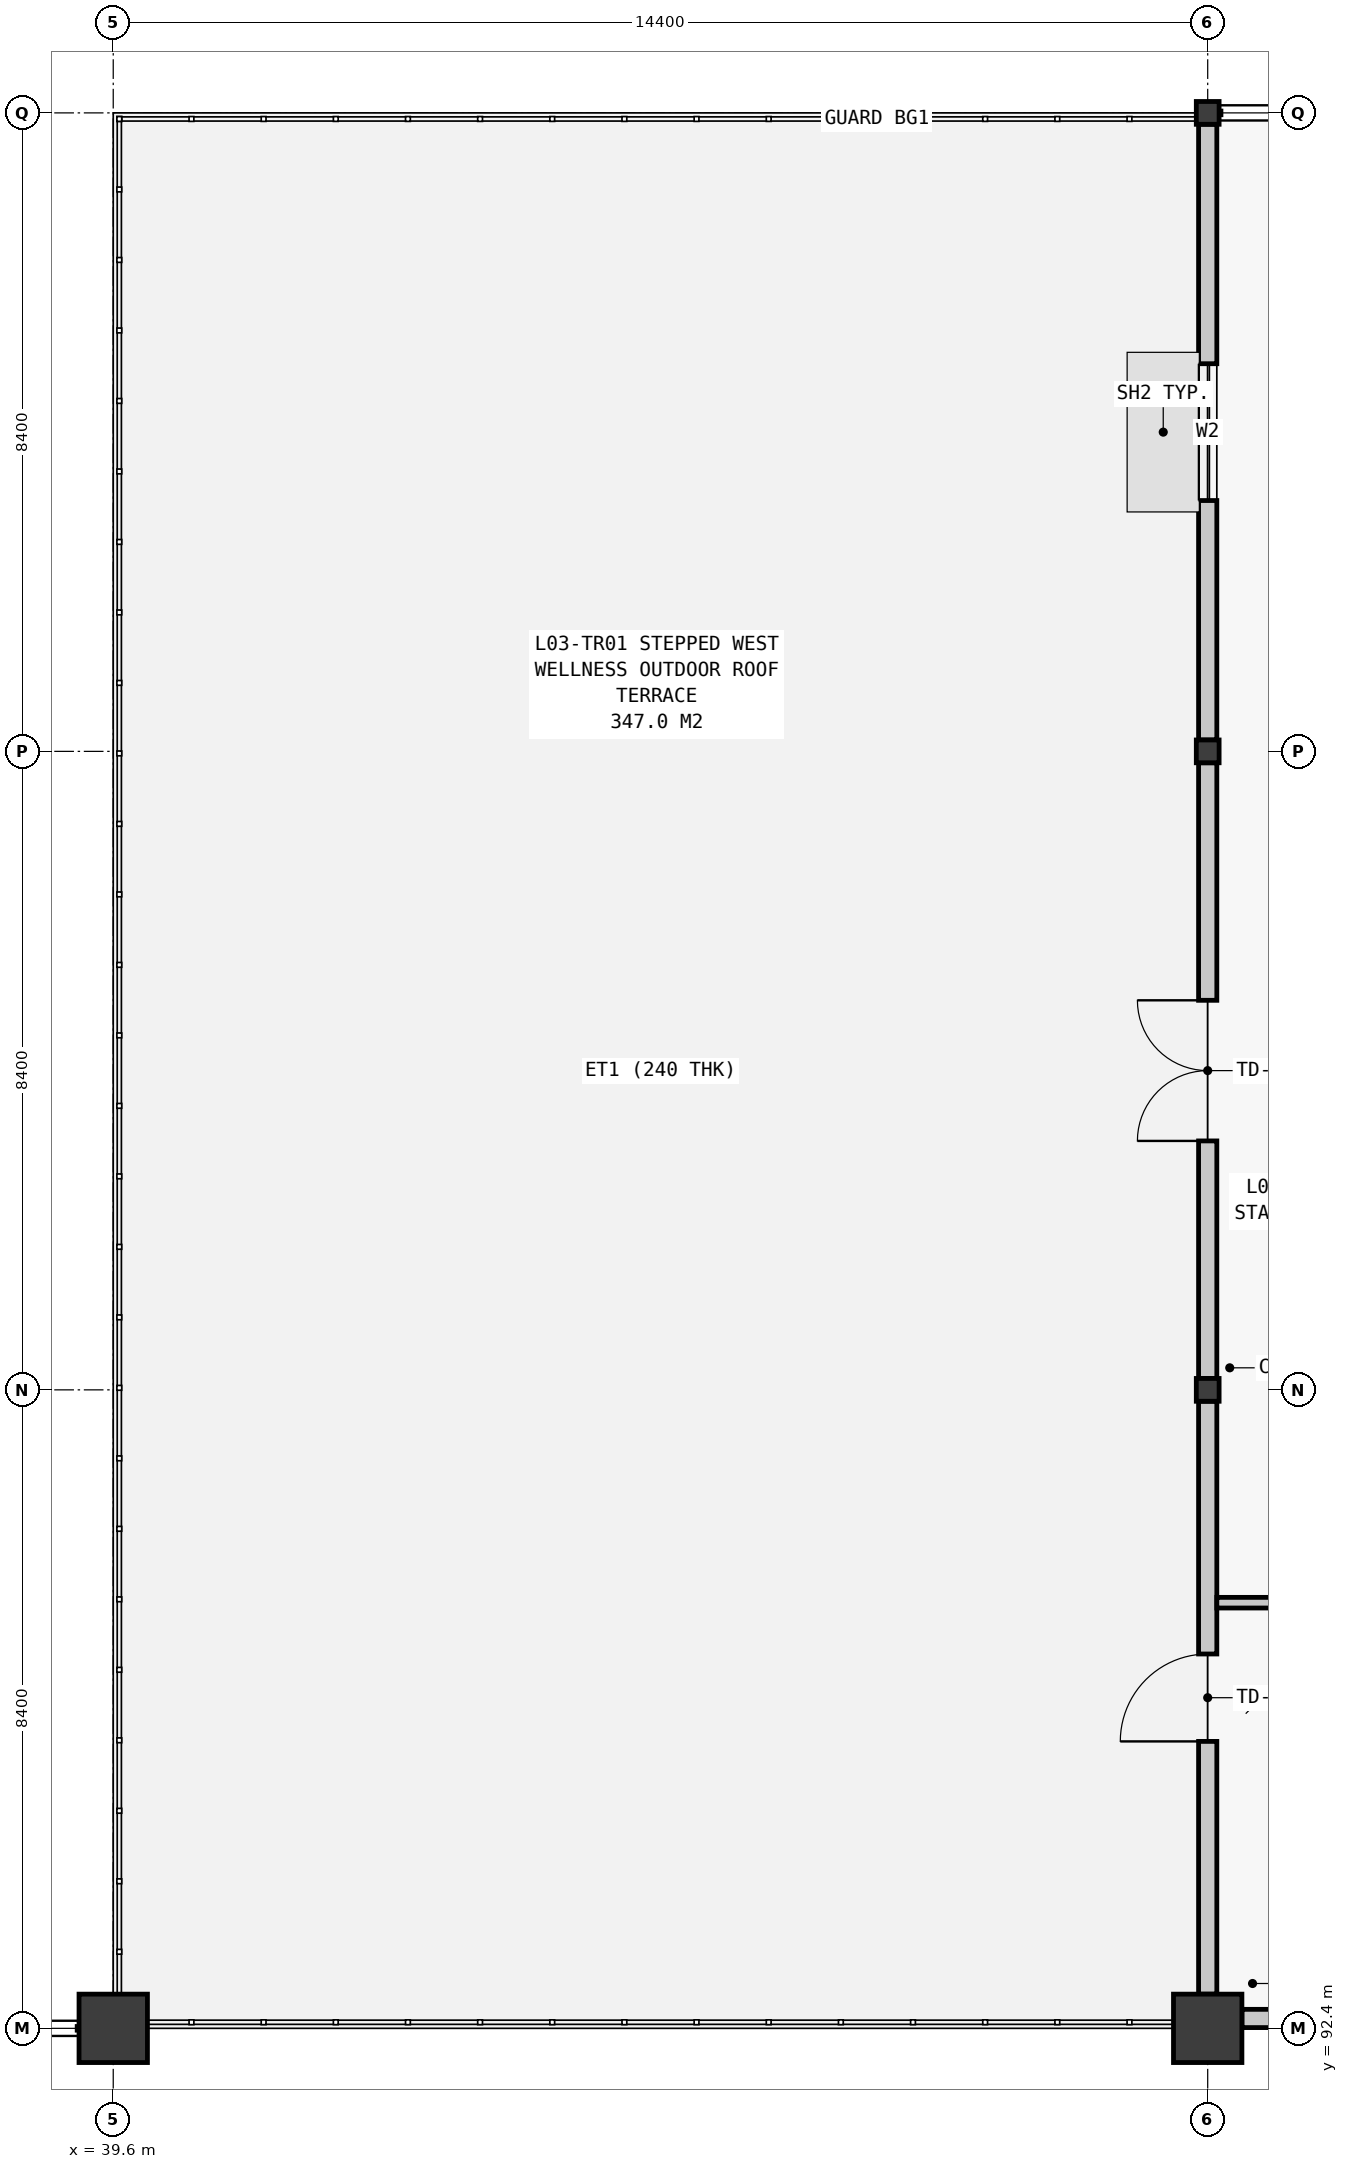
"""IFC4 building model, lengths in metres.
Left out: names, types, materials, properties, quantities, classifications, styles, units other than length and angle.
Written with IfcOpenShell. Run it as: python <this file> out.ifc"""

import sys

from ifc_helpers import new_model, si_unit, direction, frame, frame_2d, origin, origin_2d, place, context, subcontext, project, spatial, rectangle, i_section, extrude, element, fill, save


model = new_model("IFC4")
c1 = context("Model", 3, precision=1e-05, world=origin(), true_north=direction((0.0, 1.0)))
c2 = subcontext(c1, "Body", "Model", "MODEL_VIEW")
j1 = project(units=[si_unit("LENGTHUNIT", "METRE"), si_unit("PLANEANGLEUNIT", "RADIAN")], contexts=[c1])
p1 = place(None, origin())
s1 = spatial("IfcSite", under=j1, at=p1, CompositionType="ELEMENT")
p2 = place(p1, origin())
s2 = spatial("IfcBuilding", under=s1, at=p2, CompositionType="ELEMENT")
p3 = place(p2, frame((0.0, 0.0, 13.2)))
s3 = spatial("IfcBuildingStorey", under=s2, at=p3, CompositionType="ELEMENT", Elevation=13.2)
p4 = place(p3, frame((39.6, 92.4, 0.0), z_axis=(0.0, 0.0, 1.0), x_axis=(1.0, 0.0, 0.0)))
e1 = element("IfcColumn", 1, at=p4, inside=s3, PredefinedType="COLUMN", context=c2, shape_type="SweptSolid", body=[
    extrude(rectangle(XDim=0.9, YDim=0.9, at=origin_2d()), origin(), (0.0, 0.0, 1.0), 2.829),
])
p5 = place(p3, frame((54.0, 92.4, 0.0), z_axis=(0.0, 0.0, 1.0), x_axis=(1.0, 0.0, 0.0)))
e2 = element("IfcColumn", 2, at=p5, inside=s3, PredefinedType="COLUMN", context=c2, shape_type="SweptSolid", body=[
    extrude(rectangle(XDim=0.9, YDim=0.9, at=origin_2d()), origin(), (0.0, 0.0, 1.0), 0.994),
])
p6 = place(p3, frame((54.0, 92.4, 0.994), z_axis=(0.0, 0.0, 1.0), x_axis=(1.0, 0.0, 0.0)))
e3 = element("IfcColumn", 3, at=p6, inside=s3, PredefinedType="COLUMN", context=c2, shape_type="SweptSolid", body=[
    extrude(rectangle(XDim=0.65, YDim=0.65, at=origin_2d()), origin(), (0.0, 0.0, 1.0), 3.206),
])
for number, where, z_axis, x_axis in (
    (4, (54.0, 100.8, 0.0), (0.0, 0.0, 1.0), (1.0, 0.0, 0.0)),
    (5, (54.0, 109.2, 0.0), (0.0, 0.0, 1.0), (1.0, 0.0, 0.0)),
    (6, (54.0, 117.6, 0.0), (0.0, 0.0, 1.0), (1.0, 0.0, 0.0)),
):
    element("IfcColumn", number, at=place(p3, frame(where, z_axis=z_axis, x_axis=x_axis)), inside=s3, PredefinedType="COLUMN", context=c2, shape_type="SweptSolid", body=[
        extrude(i_section(OverallWidth=0.3, OverallDepth=0.3, WebThickness=0.011, FlangeThickness=0.019, FilletRadius=0.027, at=origin_2d()), origin(), (0.0, 0.0, 1.0), 4.2),
    ])
p7 = place(p3, frame((54.0, 100.65, 0.0), z_axis=(0.0, 0.0, 1.0), x_axis=(0.0, -1.0, 0.0)))
e7 = element("IfcWall", 7, at=p7, inside=s3, PredefinedType="STANDARD", context=c2, shape_type="SweptSolid", body=[
    extrude(rectangle(XDim=7.8, YDim=0.24, at=frame_2d((3.9, 0.0))), origin(), (0.0, 0.0, 1.0), 3.427),
])
p8 = place(p7, frame((3.325, 0.0, 0.0)))
e8 = element("IfcOpeningElement", 8, at=p8, cuts=e7, PredefinedType="OPENING", context=c2, shape_type="SweptSolid", body=[
    extrude(rectangle(XDim=1.15, YDim=2.25, at=frame_2d((0.575, 1.125))), frame((0.0, 0.135, 0.0), z_axis=(0.0, -1.0, 0.0), x_axis=(1.0, 0.0, 0.0)), (0.0, 0.0, 1.0), 0.27),
])
p9 = place(p3, frame((54.0, 109.05, 0.0), z_axis=(0.0, 0.0, 1.0), x_axis=(0.0, -1.0, 0.0)))
e9 = element("IfcWall", 9, at=p9, inside=s3, PredefinedType="STANDARD", context=c2, shape_type="SweptSolid", body=[
    extrude(rectangle(XDim=8.1, YDim=0.24, at=frame_2d((4.05, 0.0))), origin(), (0.0, 0.0, 1.0), 3.427),
])
p10 = place(p9, frame((3.125, 0.0, 0.0)))
e10 = element("IfcOpeningElement", 10, at=p10, cuts=e9, PredefinedType="OPENING", context=c2, shape_type="SweptSolid", body=[
    extrude(rectangle(XDim=1.85, YDim=2.25, at=frame_2d((0.925, 1.125))), frame((0.0, 0.135, 0.0), z_axis=(0.0, -1.0, 0.0), x_axis=(1.0, 0.0, 0.0)), (0.0, 0.0, 1.0), 0.27),
])
p11 = place(p3, frame((54.0, 117.45, 0.0), z_axis=(0.0, 0.0, 1.0), x_axis=(0.0, -1.0, 0.0)))
e11 = element("IfcWall", 11, at=p11, inside=s3, PredefinedType="STANDARD", context=c2, shape_type="SweptSolid", body=[
    extrude(rectangle(XDim=8.1, YDim=0.24, at=frame_2d((4.05, 0.0))), origin(), (0.0, 0.0, 1.0), 3.427),
])
p12 = place(p11, frame((3.15, 0.0, 0.9)))
e12 = element("IfcOpeningElement", 12, at=p12, cuts=e11, PredefinedType="OPENING", context=c2, shape_type="SweptSolid", body=[
    extrude(rectangle(XDim=1.8, YDim=1.8, at=frame_2d((0.9, 0.9))), frame((0.0, 0.135, 0.0), z_axis=(0.0, -1.0, 0.0), x_axis=(1.0, 0.0, 0.0)), (0.0, 0.0, 1.0), 0.27),
])
p13 = place(p3, frame((54.45, 92.53, 0.0), z_axis=(0.0, 0.0, 1.0), x_axis=(1.0, 0.0, 0.0)))
e13 = element("IfcWall", 13, at=p13, inside=s3, PredefinedType="STANDARD", context=c2, shape_type="SweptSolid", body=[
    extrude(rectangle(XDim=13.5, YDim=0.24, at=frame_2d((6.75, 0.0))), origin(), (0.0, 0.0, 1.0), 1.79),
])
p14 = place(p3, frame((54.12, 98.0, 0.0), z_axis=(0.0, 0.0, 1.0), x_axis=(1.0, 0.0, 0.0)))
e14 = element("IfcWall", 14, at=p14, inside=s3, PredefinedType="PARTITIONING", context=c2, shape_type="SweptSolid", body=[
    extrude(rectangle(XDim=23.88, YDim=0.14, at=frame_2d((11.94, 0.0))), origin(), (0.0, 0.0, 1.0), 3.97),
])
p15 = place(p14, frame((11.465, 0.0, 0.0)))
e15 = element("IfcOpeningElement", 15, at=p15, cuts=e14, PredefinedType="OPENING", context=c2, shape_type="SweptSolid", body=[
    extrude(rectangle(XDim=0.95, YDim=2.15, at=frame_2d((0.475, 1.075))), frame((0.0, 0.085, 0.0), z_axis=(0.0, -1.0, 0.0), x_axis=(1.0, 0.0, 0.0)), (0.0, 0.0, 1.0), 0.17),
])
p16 = place(p8, frame((1.15, 0.0, 0.0), z_axis=(0.0, 0.0, 1.0), x_axis=(-1.0, 0.0, 0.0)))
e16 = element("IfcDoor", 16, at=p16, inside=s3, OperationType="SINGLE_SWING_RIGHT", PredefinedType="DOOR", context=c2, shape_type="SweptSolid", body=[
    extrude(rectangle(XDim=1.15, YDim=2.25, at=frame_2d((0.575, 1.125))), frame((0.0, 0.025, 0.0), z_axis=(0.0, -1.0, 0.0), x_axis=(1.0, 0.0, 0.0)), (0.0, 0.0, 1.0), 0.05),
])
fill(e8, e16)
p17 = place(p10, frame((1.85, 0.0, 0.0), z_axis=(0.0, 0.0, 1.0), x_axis=(-1.0, 0.0, 0.0)))
e17 = element("IfcDoor", 17, at=p17, inside=s3, OperationType="DOUBLE_DOOR_SINGLE_SWING", PredefinedType="DOOR", context=c2, shape_type="SweptSolid", body=[
    extrude(rectangle(XDim=1.85, YDim=2.25, at=frame_2d((0.925, 1.125))), frame((0.0, 0.025, 0.0), z_axis=(0.0, -1.0, 0.0), x_axis=(1.0, 0.0, 0.0)), (0.0, 0.0, 1.0), 0.05),
])
fill(e10, e17)
p18 = place(p12, origin())
e18 = element("IfcWindow", 18, at=p18, inside=s3, PartitioningType="SINGLE_PANEL", PredefinedType="WINDOW", context=c2, shape_type="SweptSolid", body=[
    extrude(rectangle(XDim=1.8, YDim=1.8, at=frame_2d((0.9, 0.9))), frame((0.0, 0.03, 0.0), z_axis=(0.0, -1.0, 0.0), x_axis=(1.0, 0.0, 0.0)), (0.0, 0.0, 1.0), 0.06),
])
fill(e12, e18)
save(model, sys.argv[1])
